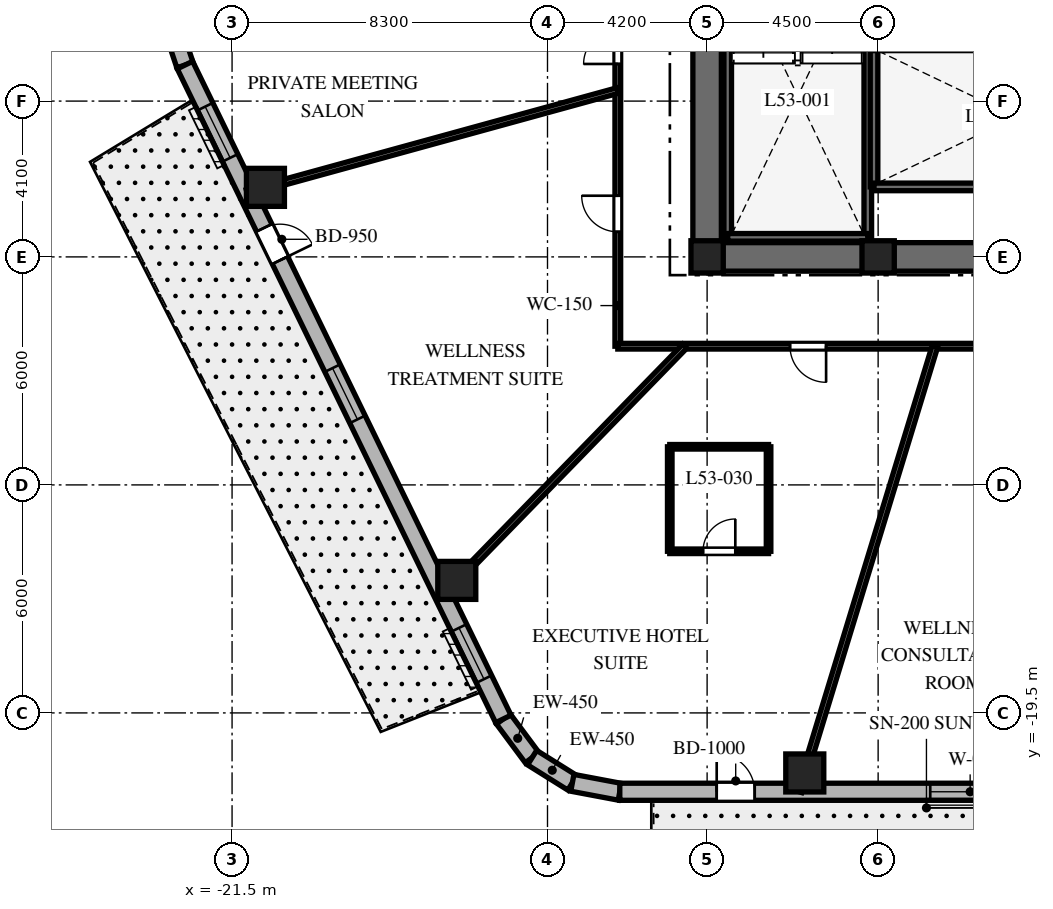
"""IFC4 building model, lengths in metres.
Left out: names, types, materials, properties, quantities, classifications, styles, units other than length and angle.
Written with IfcOpenShell. Run it as: python <this file> out.ifc"""

import sys

from ifc_helpers import new_model, si_unit, direction, frame, frame_2d, origin, origin_2d, place, context, subcontext, project, spatial, rectangle, extrude, element, fill, save


model = new_model("IFC4")
c1 = context("Model", 3, precision=1e-05, world=origin(), true_north=direction((0.0, 1.0)))
c2 = subcontext(c1, "Body", "Model", "MODEL_VIEW")
j1 = project(units=[si_unit("LENGTHUNIT", "METRE"), si_unit("PLANEANGLEUNIT", "RADIAN")], contexts=[c1])
p1 = place(None, origin())
s1 = spatial("IfcSite", under=j1, at=p1, CompositionType="ELEMENT")
p2 = place(p1, origin())
s2 = spatial("IfcBuilding", under=s1, at=p2, CompositionType="ELEMENT")
p3 = place(p2, frame((0.0, 0.0, 214.1)))
s3 = spatial("IfcBuildingStorey", under=s2, at=p3, CompositionType="ELEMENT", Elevation=214.1)
p4 = place(p3, frame((-9.375, -7.5, 0.0), z_axis=(0.0, 0.0, 1.0), x_axis=(1.0, 0.0, 0.0)))
e1 = element("IfcWall", 1, at=p4, inside=s3, PredefinedType="SHEAR", context=c2, shape_type="SweptSolid", body=[
    extrude(rectangle(XDim=18.75, YDim=0.75, at=frame_2d((9.375, 0.0))), origin(), (0.0, 0.0, 1.0), 3.8),
])
p5 = place(p4, frame((9.425, 0.0, 0.0)))
e2 = element("IfcOpeningElement", 2, at=p5, cuts=e1, PredefinedType="OPENING", context=c2, shape_type="SweptSolid", body=[
    extrude(rectangle(XDim=1.0, YDim=2.15, at=frame_2d((0.5, 1.075))), frame((0.0, 0.385, 0.0), z_axis=(0.0, -1.0, 0.0), x_axis=(1.0, 0.0, 0.0)), (0.0, 0.0, 1.0), 0.77),
])
p6 = place(p3, frame((-9.0, -7.125, 0.0), z_axis=(0.0, 0.0, 1.0), x_axis=(0.0, 1.0, 0.0)))
e3 = element("IfcWall", 3, at=p6, inside=s3, PredefinedType="SHEAR", context=c2, shape_type="SweptSolid", body=[
    extrude(rectangle(XDim=14.25, YDim=0.75, at=frame_2d((7.125, 0.0))), origin(), (0.0, 0.0, 1.0), 3.8),
])
p7 = place(p6, frame((10.25, 0.0, 0.0)))
e4 = element("IfcOpeningElement", 4, at=p7, cuts=e3, PredefinedType="OPENING", context=c2, shape_type="SweptSolid", body=[
    extrude(rectangle(XDim=1.05, YDim=2.15, at=frame_2d((0.525, 1.075))), frame((0.0, 0.385, 0.0), z_axis=(0.0, -1.0, 0.0), x_axis=(1.0, 0.0, 0.0)), (0.0, 0.0, 1.0), 0.77),
])
for number, where, z_axis, x_axis in (
    (5, (-8.458, -6.985, 0.0), (0.0, 0.0, 1.0), (0.0, 1.0, 0.0)),
    (6, (-4.772, -6.985, 0.0), (0.0, 0.0, 1.0), (0.0, 1.0, 0.0)),
):
    element("IfcWall", number, at=place(p3, frame(where, z_axis=z_axis, x_axis=x_axis)), inside=s3, PredefinedType="SHEAR", context=c2, shape_type="SweptSolid", body=[
        extrude(rectangle(XDim=9.143, YDim=0.2, at=frame_2d((4.572, 0.0))), origin(), (0.0, 0.0, 1.0), 3.8),
    ])
for number, where, z_axis, x_axis in (
    (7, (-8.458, -6.985, 0.0), (0.0, 0.0, 1.0), (1.0, 0.0, 0.0)),
    (8, (-4.608, -5.658, 0.0), (0.0, 0.0, 1.0), (0.0, 1.0, 0.0)),
):
    element("IfcWall", number, at=place(p3, frame(where, z_axis=z_axis, x_axis=x_axis)), inside=s3, PredefinedType="SHEAR", context=c2, shape_type="SweptSolid", body=[
        extrude(rectangle(XDim=3.686, YDim=0.2, at=frame_2d((1.843, 0.0))), origin(), (0.0, 0.0, 1.0), 3.8),
    ])
p8 = place(p3, frame((-4.608, -5.658, 0.0), z_axis=(0.0, 0.0, 1.0), x_axis=(1.0, 0.0, 0.0)))
e9 = element("IfcWall", 9, at=p8, inside=s3, PredefinedType="SHEAR", context=c2, shape_type="SweptSolid", body=[
    extrude(rectangle(XDim=9.166, YDim=0.2, at=frame_2d((4.583, 0.0))), origin(), (0.0, 0.0, 1.0), 3.8),
])
p9 = place(p8, frame((7.45, 0.0, 0.0)))
e10 = element("IfcOpeningElement", 10, at=p9, cuts=e9, PredefinedType="OPENING", context=c2, shape_type="SweptSolid", body=[
    extrude(rectangle(XDim=1.0, YDim=2.15, at=frame_2d((0.5, 1.075))), frame((0.0, 0.11, 0.0), z_axis=(0.0, -1.0, 0.0), x_axis=(1.0, 0.0, 0.0)), (0.0, 0.0, 1.0), 0.22),
])
for number, where, z_axis, x_axis in (
    (11, (-9.0, -7.5, 0.0), (0.0, 0.0, 1.0), (1.0, 0.0, 0.0)),
    (12, (-4.5, -7.5, 0.0), (0.0, 0.0, 1.0), (1.0, 0.0, 0.0)),
):
    element("IfcColumn", number, at=place(p3, frame(where, z_axis=z_axis, x_axis=x_axis)), inside=s3, PredefinedType="COLUMN", context=c2, shape_type="SweptSolid", body=[
        extrude(rectangle(XDim=0.85, YDim=0.85, at=origin_2d()), origin(), (0.0, 0.0, 1.0), 3.8),
    ])
for number, where, z_axis, x_axis in (
    (13, (-6.43, -21.08, 0.0), (0.0, 0.0, 1.0), (1.0, 0.0, 0.0)),
    (14, (-20.622, -5.67, 0.0), (0.0, 0.0, 1.0), (1.0, 0.0, 0.0)),
    (15, (-15.587, -16.013, 0.0), (0.0, 0.0, 1.0), (1.0, 0.0, 0.0)),
):
    element("IfcColumn", number, at=place(p3, frame(where, z_axis=z_axis, x_axis=x_axis)), inside=s3, PredefinedType="COLUMN", context=c2, shape_type="SweptSolid", body=[
        extrude(rectangle(XDim=1.0, YDim=1.0, at=origin_2d()), origin(), (0.0, 0.0, 1.0), 3.8),
    ])
p10 = place(p3, frame((-14.362, -19.658, 0.0), z_axis=(0.0, 0.0, 1.0), x_axis=(0.596642462792, -0.80250717853, 0.0)))
e16 = element("IfcWall", 16, at=p10, inside=s3, PredefinedType="SOLIDWALL", context=c2, shape_type="SweptSolid", body=[
    extrude(rectangle(XDim=1.27, YDim=0.45, at=frame_2d((0.635, 0.0))), origin(), (0.0, 0.0, 1.0), 3.5),
])
p11 = place(p3, frame((-13.604, -20.678, 0.0), z_axis=(0.0, 0.0, 1.0), x_axis=(0.847910404124, -0.53013955387, 0.0)))
e17 = element("IfcWall", 17, at=p11, inside=s3, PredefinedType="SOLIDWALL", context=c2, shape_type="SweptSolid", body=[
    extrude(rectangle(XDim=1.249, YDim=0.45, at=frame_2d((0.624, 0.0))), origin(), (0.0, 0.0, 1.0), 3.5),
])
p12 = place(p3, frame((-12.546, -21.34, 0.0), z_axis=(0.0, 0.0, 1.0), x_axis=(0.982686750835, -0.18527479519, 0.0)))
e18 = element("IfcWall", 18, at=p12, inside=s3, PredefinedType="SOLIDWALL", context=c2, shape_type="SweptSolid", body=[
    extrude(rectangle(XDim=1.27, YDim=0.45, at=frame_2d((0.635, 0.0))), origin(), (0.0, 0.0, 1.0), 3.5),
])
p13 = place(p3, frame((-23.023, -1.604, 0.0), z_axis=(0.0, 0.0, 1.0), x_axis=(0.316801227695, -0.948491951537, 0.0)))
e19 = element("IfcWall", 19, at=p13, inside=s3, PredefinedType="SOLIDWALL", context=c2, shape_type="SweptSolid", body=[
    extrude(rectangle(XDim=0.894, YDim=0.45, at=frame_2d((0.447, 0.0))), origin(), (0.0, 0.0, 1.0), 3.5),
])
p14 = place(p3, frame((-11.298, -21.575, 0.0), z_axis=(0.0, 0.0, 1.0), x_axis=(1.0, 0.0, 0.0)))
e20 = element("IfcWall", 20, at=p14, inside=s3, PredefinedType="SOLIDWALL", context=c2, shape_type="SweptSolid", body=[
    extrude(rectangle(XDim=24.399, YDim=0.45, at=frame_2d((12.2, 0.0))), origin(), (0.0, 0.0, 1.0), 3.5),
])
p15 = place(p14, frame((2.55, 0.0, 0.0)))
e21 = element("IfcOpeningElement", 21, at=p15, cuts=e20, PredefinedType="OPENING", context=c2, shape_type="SweptSolid", body=[
    extrude(rectangle(XDim=1.0, YDim=2.15, at=frame_2d((0.5, 1.075))), frame((0.0, 0.235, 0.0), z_axis=(0.0, -1.0, 0.0), x_axis=(1.0, 0.0, 0.0)), (0.0, 0.0, 1.0), 0.47),
])
p16 = place(p14, frame((8.169, 0.0, 0.8)))
e22 = element("IfcOpeningElement", 22, at=p16, cuts=e20, PredefinedType="OPENING", context=c2, shape_type="SweptSolid", body=[
    extrude(rectangle(XDim=2.1, YDim=1.85, at=frame_2d((1.05, 0.925))), frame((0.0, 0.235, 0.0), z_axis=(0.0, -1.0, 0.0), x_axis=(1.0, 0.0, 0.0)), (0.0, 0.0, 1.0), 0.47),
])
p17 = place(p14, frame((14.922, 0.0, 0.8)))
e23 = element("IfcOpeningElement", 23, at=p17, cuts=e20, PredefinedType="OPENING", context=c2, shape_type="SweptSolid", body=[
    extrude(rectangle(XDim=2.1, YDim=1.85, at=frame_2d((1.05, 0.925))), frame((0.0, 0.235, 0.0), z_axis=(0.0, -1.0, 0.0), x_axis=(1.0, 0.0, 0.0)), (0.0, 0.0, 1.0), 0.47),
])
p18 = place(p14, frame((20.996, 0.0, 0.8)))
e24 = element("IfcOpeningElement", 24, at=p18, cuts=e20, PredefinedType="OPENING", context=c2, shape_type="SweptSolid", body=[
    extrude(rectangle(XDim=2.1, YDim=1.85, at=frame_2d((1.05, 0.925))), frame((0.0, 0.235, 0.0), z_axis=(0.0, -1.0, 0.0), x_axis=(1.0, 0.0, 0.0)), (0.0, 0.0, 1.0), 0.47),
])
p19 = place(p3, frame((-22.74, -2.452, 0.0), z_axis=(0.0, 0.0, 1.0), x_axis=(0.437753424814, -0.899095066755, 0.0)))
e25 = element("IfcWall", 25, at=p19, inside=s3, PredefinedType="SOLIDWALL", context=c2, shape_type="SweptSolid", body=[
    extrude(rectangle(XDim=19.137, YDim=0.45, at=frame_2d((9.569, 0.0))), origin(), (0.0, 0.0, 1.0), 3.5),
])
p20 = place(p19, frame((4.763, 0.0, 0.0)))
e26 = element("IfcOpeningElement", 26, at=p20, cuts=e25, PredefinedType="OPENING", context=c2, shape_type="SweptSolid", body=[
    extrude(rectangle(XDim=0.95, YDim=2.15, at=frame_2d((0.475, 1.075))), frame((0.0, 0.235, 0.0), z_axis=(0.0, -1.0, 0.0), x_axis=(1.0, 0.0, 0.0)), (0.0, 0.0, 1.0), 0.47),
])
p21 = place(p19, frame((1.216, 0.0, 0.8)))
e27 = element("IfcOpeningElement", 27, at=p21, cuts=e25, PredefinedType="OPENING", context=c2, shape_type="SweptSolid", body=[
    extrude(rectangle(XDim=1.5, YDim=1.8, at=frame_2d((0.75, 0.9))), frame((0.0, 0.235, 0.0), z_axis=(0.0, -1.0, 0.0), x_axis=(1.0, 0.0, 0.0)), (0.0, 0.0, 1.0), 0.47),
])
p22 = place(p19, frame((8.87, 0.0, 0.8)))
e28 = element("IfcOpeningElement", 28, at=p22, cuts=e25, PredefinedType="OPENING", context=c2, shape_type="SweptSolid", body=[
    extrude(rectangle(XDim=1.5, YDim=1.8, at=frame_2d((0.75, 0.9))), frame((0.0, 0.235, 0.0), z_axis=(0.0, -1.0, 0.0), x_axis=(1.0, 0.0, 0.0)), (0.0, 0.0, 1.0), 0.47),
])
p23 = place(p19, frame((16.473, 0.0, 0.8)))
e29 = element("IfcOpeningElement", 29, at=p23, cuts=e25, PredefinedType="OPENING", context=c2, shape_type="SweptSolid", body=[
    extrude(rectangle(XDim=1.5, YDim=1.8, at=frame_2d((0.75, 0.9))), frame((0.0, 0.235, 0.0), z_axis=(0.0, -1.0, 0.0), x_axis=(1.0, 0.0, 0.0)), (0.0, 0.0, 1.0), 0.47),
])
p24 = place(p3, frame((-11.35, -9.85, 0.0), z_axis=(0.0, 0.0, 1.0), x_axis=(0.0, 1.0, 0.0)))
e30 = element("IfcWall", 30, at=p24, inside=s3, PredefinedType="PARTITIONING", context=c2, shape_type="SweptSolid", body=[
    extrude(rectangle(XDim=12.4, YDim=0.15, at=frame_2d((6.2, 0.0))), origin(), (0.0, 0.0, 1.0), 2.99),
])
p25 = place(p24, frame((10.017, 0.0, 0.0)))
e31 = element("IfcOpeningElement", 31, at=p25, cuts=e30, PredefinedType="OPENING", context=c2, shape_type="SweptSolid", body=[
    extrude(rectangle(XDim=0.9, YDim=2.03, at=frame_2d((0.45, 1.015))), frame((0.0, 0.085, 0.0), z_axis=(0.0, -1.0, 0.0), x_axis=(1.0, 0.0, 0.0)), (0.0, 0.0, 1.0), 0.17),
])
p26 = place(p24, frame((7.427, 0.0, 0.0)))
e32 = element("IfcOpeningElement", 32, at=p26, cuts=e30, PredefinedType="OPENING", context=c2, shape_type="SweptSolid", body=[
    extrude(rectangle(XDim=0.9, YDim=2.03, at=frame_2d((0.45, 1.015))), frame((0.0, 0.085, 0.0), z_axis=(0.0, -1.0, 0.0), x_axis=(1.0, 0.0, 0.0)), (0.0, 0.0, 1.0), 0.17),
])
p27 = place(p24, frame((3.01, 0.0, 0.0)))
e33 = element("IfcOpeningElement", 33, at=p27, cuts=e30, PredefinedType="OPENING", context=c2, shape_type="SweptSolid", body=[
    extrude(rectangle(XDim=0.95, YDim=2.03, at=frame_2d((0.475, 1.015))), frame((0.0, 0.085, 0.0), z_axis=(0.0, -1.0, 0.0), x_axis=(1.0, 0.0, 0.0)), (0.0, 0.0, 1.0), 0.17),
])
p28 = place(p3, frame((-0.92, -9.85, 0.0), z_axis=(0.0, 0.0, 1.0), x_axis=(-1.0, 0.0, 0.0)))
e34 = element("IfcWall", 34, at=p28, inside=s3, PredefinedType="PARTITIONING", context=c2, shape_type="SweptSolid", body=[
    extrude(rectangle(XDim=10.43, YDim=0.15, at=frame_2d((5.215, 0.0))), origin(), (0.0, 0.0, 1.0), 2.99),
])
p29 = place(p28, frame((4.949, 0.0, 0.0)))
e35 = element("IfcOpeningElement", 35, at=p29, cuts=e34, PredefinedType="OPENING", context=c2, shape_type="SweptSolid", body=[
    extrude(rectangle(XDim=0.95, YDim=2.03, at=frame_2d((0.475, 1.015))), frame((0.0, 0.085, 0.0), z_axis=(0.0, -1.0, 0.0), x_axis=(1.0, 0.0, 0.0)), (0.0, 0.0, 1.0), 0.17),
])
p30 = place(p3, frame((-11.35, -3.121, 0.0), z_axis=(0.0, 0.0, 1.0), x_axis=(-0.964212793822, -0.265129568758, 0.0)))
e36 = element("IfcWall", 36, at=p30, inside=s3, PredefinedType="PARTITIONING", context=c2, shape_type="SweptSolid", body=[
    extrude(rectangle(XDim=10.12, YDim=0.15, at=frame_2d((5.06, 0.0))), origin(), (0.0, 0.0, 1.0), 2.74),
])
p31 = place(p3, frame((-9.588, -9.85, 0.0), z_axis=(0.0, 0.0, 1.0), x_axis=(-0.697519469595, -0.716565830567, 0.0)))
e37 = element("IfcWall", 37, at=p31, inside=s3, PredefinedType="PARTITIONING", context=c2, shape_type="SweptSolid", body=[
    extrude(rectangle(XDim=9.126, YDim=0.15, at=frame_2d((4.563, 0.0))), origin(), (0.0, 0.0, 1.0), 2.74),
])
p32 = place(p3, frame((-3.004, -9.85, 0.0), z_axis=(0.0, 0.0, 1.0), x_axis=(-0.291775760688, -0.956486751333, 0.0)))
e38 = element("IfcWall", 38, at=p32, inside=s3, PredefinedType="PARTITIONING", context=c2, shape_type="SweptSolid", body=[
    extrude(rectangle(XDim=12.258, YDim=0.15, at=frame_2d((6.129, 0.0))), origin(), (0.0, 0.0, 1.0), 2.74),
])
p33 = place(p3, frame((-9.983, -15.247, 0.0), z_axis=(0.0, 0.0, 1.0), x_axis=(1.0, 0.0, 0.0)))
e39 = element("IfcWall", 39, at=p33, inside=s3, PredefinedType="PARTITIONING", context=c2, shape_type="SweptSolid", body=[
    extrude(rectangle(XDim=2.6, YDim=0.12, at=frame_2d((1.3, 0.0))), origin(), (0.0, 0.0, 1.0), 3.072),
])
p34 = place(p33, frame((0.875, 0.0, 0.0)))
e40 = element("IfcOpeningElement", 40, at=p34, cuts=e39, PredefinedType="OPENING", context=c2, shape_type="SweptSolid", body=[
    extrude(rectangle(XDim=0.85, YDim=2.03, at=frame_2d((0.425, 1.015))), frame((0.0, 0.07, 0.0), z_axis=(0.0, -1.0, 0.0), x_axis=(1.0, 0.0, 0.0)), (0.0, 0.0, 1.0), 0.14),
])
p35 = place(p3, frame((-7.383, -15.247, 0.0), z_axis=(0.0, 0.0, 1.0), x_axis=(0.0, 1.0, 0.0)))
e41 = element("IfcWall", 41, at=p35, inside=s3, PredefinedType="PARTITIONING", context=c2, shape_type="SweptSolid", body=[
    extrude(rectangle(XDim=2.75, YDim=0.12, at=frame_2d((1.375, 0.0))), origin(), (0.0, 0.0, 1.0), 2.94),
])
p36 = place(p3, frame((-7.383, -12.497, 0.0), z_axis=(0.0, 0.0, 1.0), x_axis=(-1.0, 0.0, 0.0)))
e42 = element("IfcWall", 42, at=p36, inside=s3, PredefinedType="PARTITIONING", context=c2, shape_type="SweptSolid", body=[
    extrude(rectangle(XDim=2.6, YDim=0.12, at=frame_2d((1.3, 0.0))), origin(), (0.0, 0.0, 1.0), 2.94),
])
p37 = place(p3, frame((-9.983, -12.497, 0.0), z_axis=(0.0, 0.0, 1.0), x_axis=(0.0, -1.0, 0.0)))
e43 = element("IfcWall", 43, at=p37, inside=s3, PredefinedType="PARTITIONING", context=c2, shape_type="SweptSolid", body=[
    extrude(rectangle(XDim=2.75, YDim=0.12, at=frame_2d((1.375, 0.0))), origin(), (0.0, 0.0, 1.0), 3.072),
])
p38 = place(p15, origin())
e44 = element("IfcDoor", 44, at=p38, inside=s3, OperationType="SINGLE_SWING_LEFT", PredefinedType="DOOR", context=c2, shape_type="SweptSolid", body=[
    extrude(rectangle(XDim=1.0, YDim=2.15, at=frame_2d((0.5, 1.075))), frame((0.0, 0.025, 0.0), z_axis=(0.0, -1.0, 0.0), x_axis=(1.0, 0.0, 0.0)), (0.0, 0.0, 1.0), 0.05),
])
fill(e21, e44)
p39 = place(p16, origin())
e45 = element("IfcWindow", 45, at=p39, inside=s3, PartitioningType="SINGLE_PANEL", PredefinedType="WINDOW", context=c2, shape_type="SweptSolid", body=[
    extrude(rectangle(XDim=2.1, YDim=1.85, at=frame_2d((1.05, 0.925))), frame((0.0, 0.03, 0.0), z_axis=(0.0, -1.0, 0.0), x_axis=(1.0, 0.0, 0.0)), (0.0, 0.0, 1.0), 0.06),
])
fill(e22, e45)
p40 = place(p20, origin())
e46 = element("IfcDoor", 46, at=p40, inside=s3, OperationType="SINGLE_SWING_RIGHT", PredefinedType="DOOR", context=c2, shape_type="SweptSolid", body=[
    extrude(rectangle(XDim=0.95, YDim=2.15, at=frame_2d((0.475, 1.075))), frame((0.0, 0.025, 0.0), z_axis=(0.0, -1.0, 0.0), x_axis=(1.0, 0.0, 0.0)), (0.0, 0.0, 1.0), 0.05),
])
fill(e26, e46)
p41 = place(p21, origin())
e47 = element("IfcWindow", 47, at=p41, inside=s3, PartitioningType="SINGLE_PANEL", PredefinedType="WINDOW", context=c2, shape_type="SweptSolid", body=[
    extrude(rectangle(XDim=1.5, YDim=1.8, at=frame_2d((0.75, 0.9))), frame((0.0, 0.03, 0.0), z_axis=(0.0, -1.0, 0.0), x_axis=(1.0, 0.0, 0.0)), (0.0, 0.0, 1.0), 0.06),
])
fill(e27, e47)
p42 = place(p22, origin())
e48 = element("IfcWindow", 48, at=p42, inside=s3, PartitioningType="SINGLE_PANEL", PredefinedType="WINDOW", context=c2, shape_type="SweptSolid", body=[
    extrude(rectangle(XDim=1.5, YDim=1.8, at=frame_2d((0.75, 0.9))), frame((0.0, 0.03, 0.0), z_axis=(0.0, -1.0, 0.0), x_axis=(1.0, 0.0, 0.0)), (0.0, 0.0, 1.0), 0.06),
])
fill(e28, e48)
p43 = place(p23, origin())
e49 = element("IfcWindow", 49, at=p43, inside=s3, PartitioningType="SINGLE_PANEL", PredefinedType="WINDOW", context=c2, shape_type="SweptSolid", body=[
    extrude(rectangle(XDim=1.5, YDim=1.8, at=frame_2d((0.75, 0.9))), frame((0.0, 0.03, 0.0), z_axis=(0.0, -1.0, 0.0), x_axis=(1.0, 0.0, 0.0)), (0.0, 0.0, 1.0), 0.06),
])
fill(e29, e49)
p44 = place(p26, origin())
e50 = element("IfcDoor", 50, at=p44, inside=s3, OperationType="SINGLE_SWING_LEFT", PredefinedType="DOOR", context=c2, shape_type="SweptSolid", body=[
    extrude(rectangle(XDim=0.9, YDim=2.03, at=frame_2d((0.45, 1.015))), frame((0.0, 0.025, 0.0), z_axis=(0.0, -1.0, 0.0), x_axis=(1.0, 0.0, 0.0)), (0.0, 0.0, 1.0), 0.05),
])
fill(e32, e50)
p45 = place(p27, origin())
e51 = element("IfcDoor", 51, at=p45, inside=s3, OperationType="SINGLE_SWING_RIGHT", PredefinedType="DOOR", context=c2, shape_type="SweptSolid", body=[
    extrude(rectangle(XDim=0.95, YDim=2.03, at=frame_2d((0.475, 1.015))), frame((0.0, 0.025, 0.0), z_axis=(0.0, -1.0, 0.0), x_axis=(1.0, 0.0, 0.0)), (0.0, 0.0, 1.0), 0.05),
])
fill(e33, e51)
p46 = place(p29, origin())
e52 = element("IfcDoor", 52, at=p46, inside=s3, OperationType="SINGLE_SWING_LEFT", PredefinedType="DOOR", context=c2, shape_type="SweptSolid", body=[
    extrude(rectangle(XDim=0.95, YDim=2.03, at=frame_2d((0.475, 1.015))), frame((0.0, 0.025, 0.0), z_axis=(0.0, -1.0, 0.0), x_axis=(1.0, 0.0, 0.0)), (0.0, 0.0, 1.0), 0.05),
])
fill(e35, e52)
p47 = place(p34, origin())
e53 = element("IfcDoor", 53, at=p47, inside=s3, OperationType="SINGLE_SWING_RIGHT", PredefinedType="DOOR", context=c2, shape_type="SweptSolid", body=[
    extrude(rectangle(XDim=0.85, YDim=2.03, at=frame_2d((0.425, 1.015))), frame((0.0, 0.025, 0.0), z_axis=(0.0, -1.0, 0.0), x_axis=(1.0, 0.0, 0.0)), (0.0, 0.0, 1.0), 0.05),
])
fill(e40, e53)
save(model, sys.argv[1])
